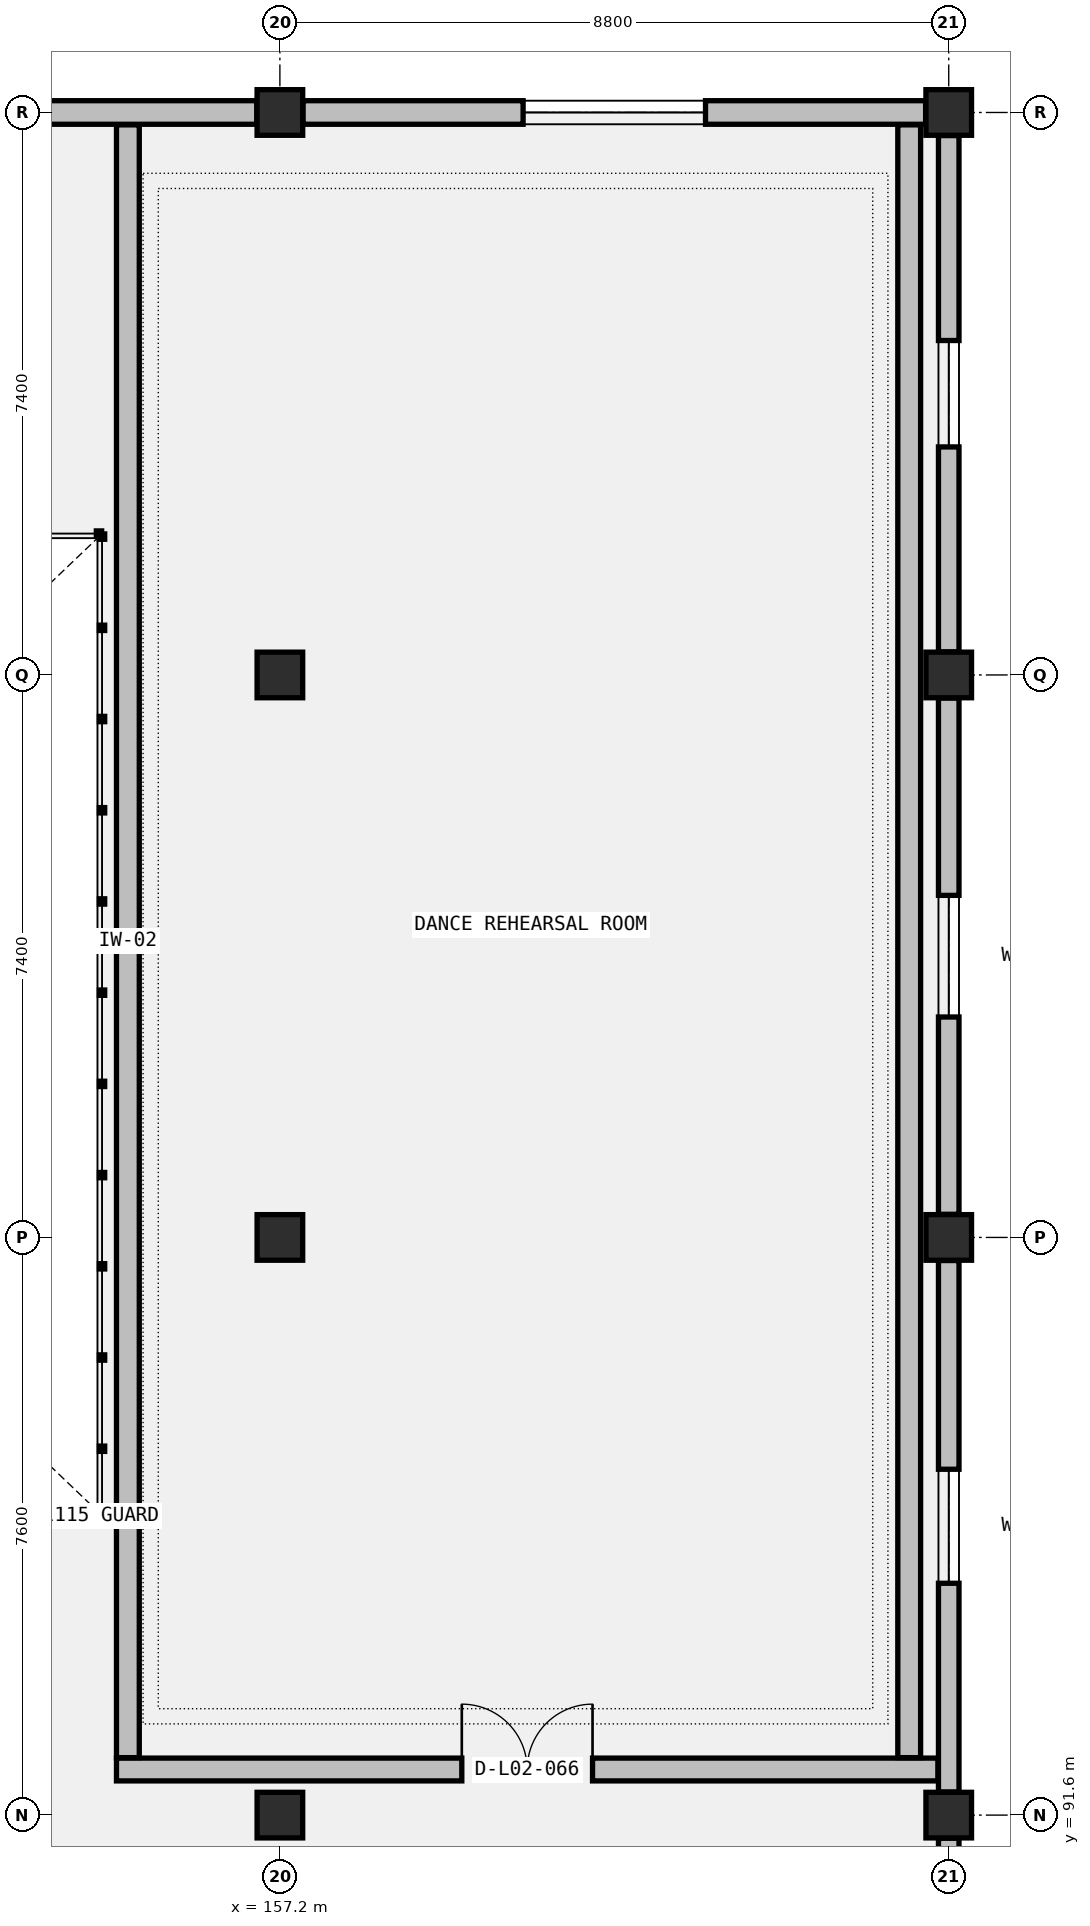
"""IFC4 building model, lengths in metres.
Left out: names, types, materials, properties, quantities, classifications, styles, units other than length and angle.
Written with IfcOpenShell. Run it as: python <this file> out.ifc"""

import sys

from ifc_helpers import new_model, si_unit, direction, frame, frame_2d, origin, origin_2d, place, context, subcontext, project, spatial, rectangle, extrude, element, fill, save


model = new_model("IFC4")
c1 = context("Model", 3, precision=1e-05, world=origin(), true_north=direction((0.0, 1.0)))
c2 = subcontext(c1, "Body", "Model", "MODEL_VIEW")
j1 = project(units=[si_unit("LENGTHUNIT", "METRE"), si_unit("PLANEANGLEUNIT", "RADIAN")], contexts=[c1])
p1 = place(None, origin())
s1 = spatial("IfcSite", under=j1, at=p1, CompositionType="ELEMENT")
p2 = place(p1, origin())
s2 = spatial("IfcBuilding", under=s1, at=p2, CompositionType="ELEMENT")
p3 = place(p2, frame((0.0, 0.0, 10.0)))
s3 = spatial("IfcBuildingStorey", under=s2, at=p3, CompositionType="ELEMENT", Elevation=10.0)
for number, where, z_axis, x_axis in (
    (1, (157.2, 91.6, 0.0), (0.0, 0.0, 1.0), (1.0, 0.0, 0.0)),
    (2, (157.2, 99.2, 0.0), (0.0, 0.0, 1.0), (1.0, 0.0, 0.0)),
    (3, (157.2, 106.6, 0.0), (0.0, 0.0, 1.0), (1.0, 0.0, 0.0)),
    (4, (157.2, 114.0, 0.0), (0.0, 0.0, 1.0), (1.0, 0.0, 0.0)),
    (5, (166.0, 91.6, 0.0), (0.0, 0.0, 1.0), (1.0, 0.0, 0.0)),
    (6, (166.0, 99.2, 0.0), (0.0, 0.0, 1.0), (1.0, 0.0, 0.0)),
    (7, (166.0, 106.6, 0.0), (0.0, 0.0, 1.0), (1.0, 0.0, 0.0)),
    (8, (166.0, 114.0, 0.0), (0.0, 0.0, 1.0), (1.0, 0.0, 0.0)),
):
    element("IfcColumn", number, at=place(p3, frame(where, z_axis=z_axis, x_axis=x_axis)), inside=s3, PredefinedType="COLUMN", context=c2, shape_type="SweptSolid", body=[
        extrude(rectangle(XDim=0.6, YDim=0.6, at=origin_2d()), origin(), (0.0, 0.0, 1.0), 4.6),
    ])
p4 = place(p3, frame((148.704, 114.0, 0.0), z_axis=(0.0, 0.0, 1.0), x_axis=(1.0, 0.0, 0.0)))
e9 = element("IfcWall", 9, at=p4, inside=s3, PredefinedType="STANDARD", context=c2, shape_type="SweptSolid", body=[
    extrude(rectangle(XDim=8.192, YDim=0.31, at=frame_2d((4.096, 0.0))), origin(), (0.0, 0.0, 1.0), 3.738),
])
p5 = place(p4, frame((2.896, 0.0, 0.9)))
e10 = element("IfcOpeningElement", 10, at=p5, cuts=e9, PredefinedType="OPENING", context=c2, shape_type="SweptSolid", body=[
    extrude(rectangle(XDim=2.4, YDim=2.4, at=frame_2d((1.2, 1.2))), frame((0.0, 0.165, 0.0), z_axis=(0.0, -1.0, 0.0), x_axis=(1.0, 0.0, 0.0)), (0.0, 0.0, 1.0), 0.33),
])
p6 = place(p3, frame((157.504, 114.0, 0.0), z_axis=(0.0, 0.0, 1.0), x_axis=(1.0, 0.0, 0.0)))
e11 = element("IfcWall", 11, at=p6, inside=s3, PredefinedType="STANDARD", context=c2, shape_type="SweptSolid", body=[
    extrude(rectangle(XDim=8.192, YDim=0.31, at=frame_2d((4.096, 0.0))), origin(), (0.0, 0.0, 1.0), 3.738),
])
p7 = place(p6, frame((2.896, 0.0, 0.9)))
e12 = element("IfcOpeningElement", 12, at=p7, cuts=e11, PredefinedType="OPENING", context=c2, shape_type="SweptSolid", body=[
    extrude(rectangle(XDim=2.4, YDim=2.4, at=frame_2d((1.2, 1.2))), frame((0.0, 0.165, 0.0), z_axis=(0.0, -1.0, 0.0), x_axis=(1.0, 0.0, 0.0)), (0.0, 0.0, 1.0), 0.33),
])
p8 = place(p3, frame((166.0, 84.304, 0.0), z_axis=(0.0, 0.0, 1.0), x_axis=(0.0, 1.0, 0.0)))
e13 = element("IfcWall", 13, at=p8, inside=s3, PredefinedType="STANDARD", context=c2, shape_type="SweptSolid", body=[
    extrude(rectangle(XDim=6.992, YDim=0.27, at=frame_2d((3.496, 0.0))), origin(), (0.0, 0.0, 1.0), 4.034),
])
p9 = place(p8, frame((2.196, 0.0, 0.9)))
e14 = element("IfcOpeningElement", 14, at=p9, cuts=e13, PredefinedType="OPENING", context=c2, shape_type="SweptSolid", body=[
    extrude(rectangle(XDim=2.6, YDim=2.2, at=frame_2d((1.3, 1.1))), frame((0.0, 0.145, 0.0), z_axis=(0.0, -1.0, 0.0), x_axis=(1.0, 0.0, 0.0)), (0.0, 0.0, 1.0), 0.29),
])
p10 = place(p3, frame((166.0, 91.904, 0.0), z_axis=(0.0, 0.0, 1.0), x_axis=(0.0, 1.0, 0.0)))
e15 = element("IfcWall", 15, at=p10, inside=s3, PredefinedType="STANDARD", context=c2, shape_type="SweptSolid", body=[
    extrude(rectangle(XDim=6.992, YDim=0.27, at=frame_2d((3.496, 0.0))), origin(), (0.0, 0.0, 1.0), 4.044),
])
p11 = place(p10, frame((2.746, 0.0, 0.9)))
e16 = element("IfcOpeningElement", 16, at=p11, cuts=e15, PredefinedType="OPENING", context=c2, shape_type="SweptSolid", body=[
    extrude(rectangle(XDim=1.5, YDim=2.15, at=frame_2d((0.75, 1.075))), frame((0.0, 0.145, 0.0), z_axis=(0.0, -1.0, 0.0), x_axis=(1.0, 0.0, 0.0)), (0.0, 0.0, 1.0), 0.29),
])
p12 = place(p3, frame((166.0, 99.504, 0.0), z_axis=(0.0, 0.0, 1.0), x_axis=(0.0, 1.0, 0.0)))
e17 = element("IfcWall", 17, at=p12, inside=s3, PredefinedType="STANDARD", context=c2, shape_type="SweptSolid", body=[
    extrude(rectangle(XDim=6.792, YDim=0.27, at=frame_2d((3.396, 0.0))), origin(), (0.0, 0.0, 1.0), 4.044),
])
p13 = place(p12, frame((2.596, 0.0, 0.9)))
e18 = element("IfcOpeningElement", 18, at=p13, cuts=e17, PredefinedType="OPENING", context=c2, shape_type="SweptSolid", body=[
    extrude(rectangle(XDim=1.6, YDim=1.8, at=frame_2d((0.8, 0.9))), frame((0.0, 0.145, 0.0), z_axis=(0.0, -1.0, 0.0), x_axis=(1.0, 0.0, 0.0)), (0.0, 0.0, 1.0), 0.29),
])
p14 = place(p3, frame((166.0, 106.904, 0.0), z_axis=(0.0, 0.0, 1.0), x_axis=(0.0, 1.0, 0.0)))
e19 = element("IfcWall", 19, at=p14, inside=s3, PredefinedType="STANDARD", context=c2, shape_type="SweptSolid", body=[
    extrude(rectangle(XDim=6.792, YDim=0.27, at=frame_2d((3.396, 0.0))), origin(), (0.0, 0.0, 1.0), 4.044),
])
p15 = place(p14, frame((2.696, 0.0, 0.9)))
e20 = element("IfcOpeningElement", 20, at=p15, cuts=e19, PredefinedType="OPENING", context=c2, shape_type="SweptSolid", body=[
    extrude(rectangle(XDim=1.4, YDim=1.2, at=frame_2d((0.7, 0.6))), frame((0.0, 0.145, 0.0), z_axis=(0.0, -1.0, 0.0), x_axis=(1.0, 0.0, 0.0)), (0.0, 0.0, 1.0), 0.29),
])
p16 = place(p3, frame((155.05, 92.2, 0.0), z_axis=(0.0, 0.0, 1.0), x_axis=(1.0, 0.0, 0.0)))
e21 = element("IfcWall", 21, at=p16, inside=s3, PredefinedType="PARTITIONING", context=c2, shape_type="SweptSolid", body=[
    extrude(rectangle(XDim=10.807, YDim=0.3, at=frame_2d((5.403, 0.0))), origin(), (0.0, 0.0, 1.0), 3.738),
])
p17 = place(p16, frame((4.543, 0.0, 0.0)))
e22 = element("IfcOpeningElement", 22, at=p17, cuts=e21, PredefinedType="OPENING", context=c2, shape_type="SweptSolid", body=[
    extrude(rectangle(XDim=1.72, YDim=2.38, at=frame_2d((0.86, 1.19))), frame((0.0, 0.16, 0.0), z_axis=(0.0, -1.0, 0.0), x_axis=(1.0, 0.0, 0.0)), (0.0, 0.0, 1.0), 0.32),
])
p18 = place(p3, frame((155.2, 92.356, 0.0), z_axis=(0.0, 0.0, 1.0), x_axis=(0.0, 1.0, 0.0)))
e23 = element("IfcWall", 23, at=p18, inside=s3, PredefinedType="PARTITIONING", context=c2, shape_type="SweptSolid", body=[
    extrude(rectangle(XDim=21.481, YDim=0.3, at=frame_2d((10.74, 0.0))), origin(), (0.0, 0.0, 1.0), 3.738),
])
p19 = place(p3, frame((165.48, 92.356, 0.0), z_axis=(0.0, 0.0, 1.0), x_axis=(0.0, 1.0, 0.0)))
e24 = element("IfcWall", 24, at=p19, inside=s3, PredefinedType="PARTITIONING", context=c2, shape_type="SweptSolid", body=[
    extrude(rectangle(XDim=21.481, YDim=0.3, at=frame_2d((10.74, 0.0))), origin(), (0.0, 0.0, 1.0), 3.898),
])
p20 = place(p7, origin())
e25 = element("IfcWindow", 25, at=p20, inside=s3, PartitioningType="TRIPLE_PANEL_VERTICAL", PredefinedType="WINDOW", context=c2, shape_type="SweptSolid", body=[
    extrude(rectangle(XDim=2.4, YDim=2.4, at=frame_2d((1.2, 1.2))), frame((0.0, 0.03, 0.0), z_axis=(0.0, -1.0, 0.0), x_axis=(1.0, 0.0, 0.0)), (0.0, 0.0, 1.0), 0.06),
])
fill(e12, e25)
p21 = place(p11, origin())
e26 = element("IfcWindow", 26, at=p21, inside=s3, PartitioningType="DOUBLE_PANEL_VERTICAL", PredefinedType="WINDOW", context=c2, shape_type="SweptSolid", body=[
    extrude(rectangle(XDim=1.5, YDim=2.15, at=frame_2d((0.75, 1.075))), frame((0.0, 0.03, 0.0), z_axis=(0.0, -1.0, 0.0), x_axis=(1.0, 0.0, 0.0)), (0.0, 0.0, 1.0), 0.06),
])
fill(e16, e26)
p22 = place(p13, origin())
e27 = element("IfcWindow", 27, at=p22, inside=s3, PartitioningType="DOUBLE_PANEL_VERTICAL", PredefinedType="WINDOW", context=c2, shape_type="SweptSolid", body=[
    extrude(rectangle(XDim=1.6, YDim=1.8, at=frame_2d((0.8, 0.9))), frame((0.0, 0.03, 0.0), z_axis=(0.0, -1.0, 0.0), x_axis=(1.0, 0.0, 0.0)), (0.0, 0.0, 1.0), 0.06),
])
fill(e18, e27)
p23 = place(p15, origin())
e28 = element("IfcWindow", 28, at=p23, inside=s3, PartitioningType="SINGLE_PANEL", PredefinedType="WINDOW", context=c2, shape_type="SweptSolid", body=[
    extrude(rectangle(XDim=1.4, YDim=1.2, at=frame_2d((0.7, 0.6))), frame((0.0, 0.03, 0.0), z_axis=(0.0, -1.0, 0.0), x_axis=(1.0, 0.0, 0.0)), (0.0, 0.0, 1.0), 0.06),
])
fill(e20, e28)
p24 = place(p17, origin())
e29 = element("IfcDoor", 29, at=p24, inside=s3, OperationType="DOUBLE_DOOR_SINGLE_SWING", PredefinedType="DOOR", context=c2, shape_type="SweptSolid", body=[
    extrude(rectangle(XDim=1.72, YDim=2.38, at=frame_2d((0.86, 1.19))), frame((0.0, 0.025, 0.0), z_axis=(0.0, -1.0, 0.0), x_axis=(1.0, 0.0, 0.0)), (0.0, 0.0, 1.0), 0.05),
])
fill(e22, e29)
save(model, sys.argv[1])
